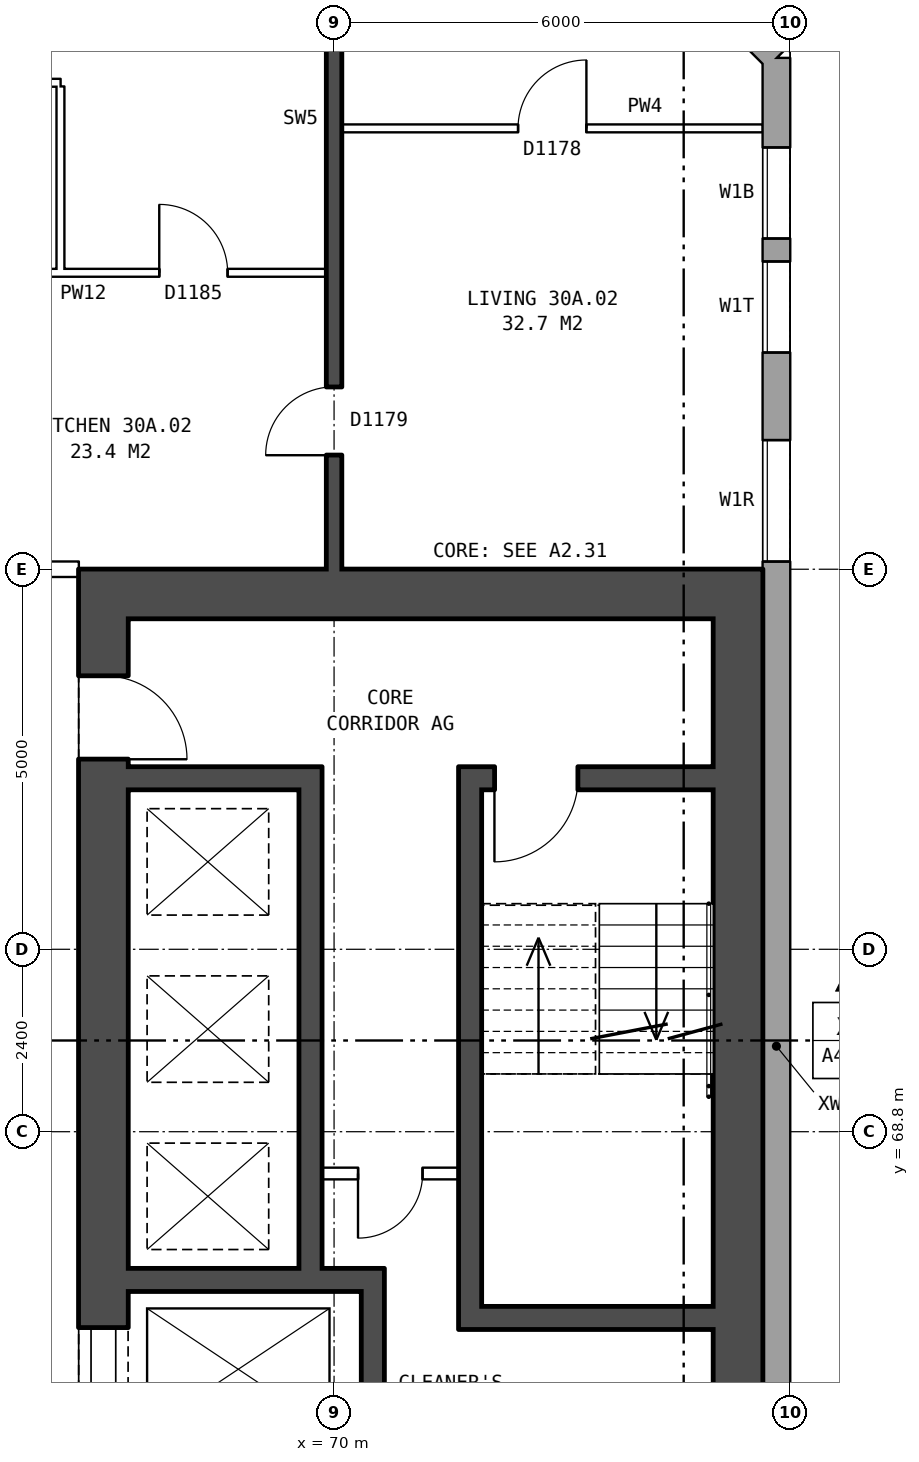
"""IFC4 building model, lengths in metres.
Left out: names, types, materials, properties, quantities, classifications, styles, units other than length and angle.
Written with IfcOpenShell. Run it as: python <this file> out.ifc"""

import sys

from ifc_helpers import new_model, si_unit, direction, frame, frame_2d, origin, place, context, subcontext, project, spatial, rectangle, extrude, element, fill, save


model = new_model("IFC4")
c1 = context("Model", 3, precision=1e-05, world=origin(), true_north=direction((0.0, 1.0)))
c2 = subcontext(c1, "Body", "Model", "MODEL_VIEW")
j1 = project(units=[si_unit("LENGTHUNIT", "METRE"), si_unit("PLANEANGLEUNIT", "RADIAN")], contexts=[c1])
p1 = place(None, origin())
s1 = spatial("IfcSite", under=j1, at=p1, CompositionType="ELEMENT")
p2 = place(p1, origin())
s2 = spatial("IfcBuilding", under=s1, at=p2, CompositionType="ELEMENT")
p3 = place(p2, frame((0.0, 0.0, 108.8)))
s3 = spatial("IfcBuildingStorey", under=s2, at=p3, CompositionType="ELEMENT", Elevation=108.8)
p4 = place(p3, frame((75.82, 57.075, 0.0), z_axis=(0.0, 0.0, 1.0), x_axis=(0.0, 1.0, 0.0)))
e1 = element("IfcWall", 1, at=p4, inside=s3, PredefinedType="STANDARD", context=c2, shape_type="SweptSolid", body=[
    extrude(rectangle(XDim=25.851, YDim=0.36, at=frame_2d((12.925, 0.0))), origin(), (0.0, 0.0, 1.0), 2.85),
])
p5 = place(p4, frame((0.3, 0.0, 0.8)))
e2 = element("IfcOpeningElement", 2, at=p5, cuts=e1, PredefinedType="OPENING", context=c2, shape_type="SweptSolid", body=[
    extrude(rectangle(XDim=1.4, YDim=1.8, at=frame_2d((0.7, 0.9))), frame((0.0, 0.19, 0.0), z_axis=(0.0, -1.0, 0.0), x_axis=(1.0, 0.0, 0.0)), (0.0, 0.0, 1.0), 0.38),
])
p6 = place(p4, frame((4.075, 0.0, 0.25)))
e3 = element("IfcOpeningElement", 3, at=p6, cuts=e1, PredefinedType="OPENING", context=c2, shape_type="SweptSolid", body=[
    extrude(rectangle(XDim=0.6, YDim=0.9, at=frame_2d((0.3, 0.45))), frame((0.0, 0.19, 0.0), z_axis=(0.0, -1.0, 0.0), x_axis=(1.0, 0.0, 0.0)), (0.0, 0.0, 1.0), 0.38),
])
p7 = place(p4, frame((19.225, 0.0, 1.7)))
e4 = element("IfcOpeningElement", 4, at=p7, cuts=e1, PredefinedType="OPENING", context=c2, shape_type="SweptSolid", body=[
    extrude(rectangle(XDim=1.6, YDim=0.9, at=frame_2d((0.8, 0.45))), frame((0.0, 0.19, 0.0), z_axis=(0.0, -1.0, 0.0), x_axis=(1.0, 0.0, 0.0)), (0.0, 0.0, 1.0), 0.38),
])
p8 = place(p4, frame((21.975, 0.0, 0.8)))
e5 = element("IfcOpeningElement", 5, at=p8, cuts=e1, PredefinedType="OPENING", context=c2, shape_type="SweptSolid", body=[
    extrude(rectangle(XDim=1.2, YDim=0.9, at=frame_2d((0.6, 0.45))), frame((0.0, 0.19, 0.0), z_axis=(0.0, -1.0, 0.0), x_axis=(1.0, 0.0, 0.0)), (0.0, 0.0, 1.0), 0.38),
])
p9 = place(p4, frame((2.0, 0.0, 0.8)))
e6 = element("IfcOpeningElement", 6, at=p9, cuts=e1, PredefinedType="OPENING", context=c2, shape_type="SweptSolid", body=[
    extrude(rectangle(XDim=0.8, YDim=1.5, at=frame_2d((0.4, 0.75))), frame((0.0, 0.19, 0.0), z_axis=(0.0, -1.0, 0.0), x_axis=(1.0, 0.0, 0.0)), (0.0, 0.0, 1.0), 0.38),
])
p10 = place(p4, frame((5.075, 0.0, 1.65)))
e7 = element("IfcOpeningElement", 7, at=p10, cuts=e1, PredefinedType="OPENING", context=c2, shape_type="SweptSolid", body=[
    extrude(rectangle(XDim=1.4, YDim=0.9, at=frame_2d((0.7, 0.45))), frame((0.0, 0.19, 0.0), z_axis=(0.0, -1.0, 0.0), x_axis=(1.0, 0.0, 0.0)), (0.0, 0.0, 1.0), 0.38),
])
p11 = place(p4, frame((23.475, 0.0, 0.8)))
e8 = element("IfcOpeningElement", 8, at=p11, cuts=e1, PredefinedType="OPENING", context=c2, shape_type="SweptSolid", body=[
    extrude(rectangle(XDim=1.2, YDim=1.8, at=frame_2d((0.6, 0.9))), frame((0.0, 0.19, 0.0), z_axis=(0.0, -1.0, 0.0), x_axis=(1.0, 0.0, 0.0)), (0.0, 0.0, 1.0), 0.38),
])
p12 = place(p3, frame((75.82, 82.925, 0.0), z_axis=(0.0, 0.0, 1.0), x_axis=(-0.707106781187, 0.707106781187, 0.0)))
e9 = element("IfcWall", 9, at=p12, inside=s3, PredefinedType="STANDARD", context=c2, shape_type="SweptSolid", body=[
    extrude(rectangle(XDim=4.094, YDim=0.36, at=frame_2d((2.047, 0.0))), origin(), (0.0, 0.0, 1.0), 2.85),
])
p13 = place(p12, frame((1.247, 0.0, 0.8)))
e10 = element("IfcOpeningElement", 10, at=p13, cuts=e9, PredefinedType="OPENING", context=c2, shape_type="SweptSolid", body=[
    extrude(rectangle(XDim=1.6, YDim=1.8, at=frame_2d((0.8, 0.9))), frame((0.0, 0.19, 0.0), z_axis=(0.0, -1.0, 0.0), x_axis=(1.0, 0.0, 0.0)), (0.0, 0.0, 1.0), 0.38),
])
p14 = place(p3, frame((66.965, 64.45, 0.0), z_axis=(0.0, 0.0, 1.0), x_axis=(0.0, 1.0, 0.0)))
e11 = element("IfcWall", 11, at=p14, inside=s3, PredefinedType="SHEAR", context=c2, shape_type="SweptSolid", body=[
    extrude(rectangle(XDim=11.1, YDim=0.65, at=frame_2d((5.55, 0.0))), origin(), (0.0, 0.0, 1.0), 2.85),
])
p15 = place(p14, frame((0.675, 0.0, 0.0)))
e12 = element("IfcOpeningElement", 12, at=p15, cuts=e11, PredefinedType="OPENING", context=c2, shape_type="SweptSolid", body=[
    extrude(rectangle(XDim=1.1, YDim=2.1, at=frame_2d((0.55, 1.05))), frame((0.0, 0.335, 0.0), z_axis=(0.0, -1.0, 0.0), x_axis=(1.0, 0.0, 0.0)), (0.0, 0.0, 1.0), 0.67),
])
p16 = place(p14, frame((9.25, 0.0, 0.0)))
e13 = element("IfcOpeningElement", 13, at=p16, cuts=e11, PredefinedType="OPENING", context=c2, shape_type="SweptSolid", body=[
    extrude(rectangle(XDim=1.1, YDim=2.1, at=frame_2d((0.55, 1.05))), frame((0.0, 0.335, 0.0), z_axis=(0.0, -1.0, 0.0), x_axis=(1.0, 0.0, 0.0)), (0.0, 0.0, 1.0), 0.67),
])
p17 = place(p3, frame((75.315, 64.45, 0.0), z_axis=(0.0, 0.0, 1.0), x_axis=(0.0, 1.0, 0.0)))
e14 = element("IfcWall", 14, at=p17, inside=s3, PredefinedType="SHEAR", context=c2, shape_type="SweptSolid", body=[
    extrude(rectangle(XDim=11.1, YDim=0.65, at=frame_2d((5.55, 0.0))), origin(), (0.0, 0.0, 1.0), 2.85),
])
p18 = place(p3, frame((66.64, 75.875, 0.0), z_axis=(0.0, 0.0, 1.0), x_axis=(1.0, 0.0, 0.0)))
e15 = element("IfcWall", 15, at=p18, inside=s3, PredefinedType="SHEAR", context=c2, shape_type="SweptSolid", body=[
    extrude(rectangle(XDim=9.0, YDim=0.65, at=frame_2d((4.5, 0.0))), origin(), (0.0, 0.0, 1.0), 2.85),
])
p19 = place(p3, frame((71.94, 66.35, 0.0), z_axis=(0.0, 0.0, 1.0), x_axis=(1.0, 0.0, 0.0)))
e16 = element("IfcWall", 16, at=p19, inside=s3, PredefinedType="SHEAR", context=c2, shape_type="SweptSolid", body=[
    extrude(rectangle(XDim=3.05, YDim=0.3, at=frame_2d((1.525, 0.0))), origin(), (0.0, 0.0, 1.0), 2.85),
])
p20 = place(p3, frame((67.29, 66.85, 0.0), z_axis=(0.0, 0.0, 1.0), x_axis=(1.0, 0.0, 0.0)))
e17 = element("IfcWall", 17, at=p20, inside=s3, PredefinedType="SHEAR", context=c2, shape_type="SweptSolid", body=[
    extrude(rectangle(XDim=3.37, YDim=0.3, at=frame_2d((1.685, 0.0))), origin(), (0.0, 0.0, 1.0), 2.85),
])
p21 = place(p3, frame((69.84, 68.25, 0.0), z_axis=(0.0, 0.0, 1.0), x_axis=(1.0, 0.0, 0.0)))
e18 = element("IfcWall", 18, at=p21, inside=s3, PredefinedType="PARTITIONING", context=c2, shape_type="SweptSolid", body=[
    extrude(rectangle(XDim=1.8, YDim=0.15, at=frame_2d((0.9, 0.0))), origin(), (0.0, 0.0, 1.0), 2.85),
])
p22 = place(p21, frame((0.475, 0.0, 0.0)))
e19 = element("IfcOpeningElement", 19, at=p22, cuts=e18, PredefinedType="OPENING", context=c2, shape_type="SweptSolid", body=[
    extrude(rectangle(XDim=0.85, YDim=2.1, at=frame_2d((0.425, 1.05))), frame((0.0, 0.085, 0.0), z_axis=(0.0, -1.0, 0.0), x_axis=(1.0, 0.0, 0.0)), (0.0, 0.0, 1.0), 0.17),
])
p23 = place(p3, frame((67.29, 73.45, 0.0), z_axis=(0.0, 0.0, 1.0), x_axis=(1.0, 0.0, 0.0)))
e20 = element("IfcWall", 20, at=p23, inside=s3, PredefinedType="SHEAR", context=c2, shape_type="SweptSolid", body=[
    extrude(rectangle(XDim=2.25, YDim=0.3, at=frame_2d((1.125, 0.0))), origin(), (0.0, 0.0, 1.0), 2.85),
])
p24 = place(p3, frame((71.94, 73.45, 0.0), z_axis=(0.0, 0.0, 1.0), x_axis=(1.0, 0.0, 0.0)))
e21 = element("IfcWall", 21, at=p24, inside=s3, PredefinedType="SHEAR", context=c2, shape_type="SweptSolid", body=[
    extrude(rectangle(XDim=3.05, YDim=0.3, at=frame_2d((1.525, 0.0))), origin(), (0.0, 0.0, 1.0), 2.85),
])
p25 = place(p24, frame((0.17, 0.0, 0.0)))
e22 = element("IfcOpeningElement", 22, at=p25, cuts=e21, PredefinedType="OPENING", context=c2, shape_type="SweptSolid", body=[
    extrude(rectangle(XDim=1.1, YDim=2.1, at=frame_2d((0.55, 1.05))), frame((0.0, 0.16, 0.0), z_axis=(0.0, -1.0, 0.0), x_axis=(1.0, 0.0, 0.0)), (0.0, 0.0, 1.0), 0.32),
])
p26 = place(p3, frame((69.69, 67.0, 0.0), z_axis=(0.0, 0.0, 1.0), x_axis=(0.0, 1.0, 0.0)))
e23 = element("IfcWall", 23, at=p26, inside=s3, PredefinedType="SHEAR", context=c2, shape_type="SweptSolid", body=[
    extrude(rectangle(XDim=6.6, YDim=0.3, at=frame_2d((3.3, 0.0))), origin(), (0.0, 0.0, 1.0), 2.85),
])
p27 = place(p3, frame((70.51, 64.45, 0.0), z_axis=(0.0, 0.0, 1.0), x_axis=(0.0, 1.0, 0.0)))
e24 = element("IfcWall", 24, at=p27, inside=s3, PredefinedType="SHEAR", context=c2, shape_type="SweptSolid", body=[
    extrude(rectangle(XDim=2.25, YDim=0.3, at=frame_2d((1.125, 0.0))), origin(), (0.0, 0.0, 1.0), 2.85),
])
p28 = place(p3, frame((71.79, 66.2, 0.0), z_axis=(0.0, 0.0, 1.0), x_axis=(0.0, 1.0, 0.0)))
e25 = element("IfcWall", 25, at=p28, inside=s3, PredefinedType="SHEAR", context=c2, shape_type="SweptSolid", body=[
    extrude(rectangle(XDim=7.4, YDim=0.3, at=frame_2d((3.7, 0.0))), origin(), (0.0, 0.0, 1.0), 2.85),
])
p29 = place(p3, frame((63.64, 76.2, 0.0), z_axis=(0.0, 0.0, 1.0), x_axis=(1.0, 0.0, 0.0)))
e26 = element("IfcWall", 26, at=p29, inside=s3, PredefinedType="PARTITIONING", context=c2, shape_type="SweptSolid", body=[
    extrude(rectangle(XDim=3.0, YDim=0.2, at=frame_2d((1.5, 0.0))), origin(), (0.0, 0.0, 1.0), 2.85),
])
p30 = place(p29, frame((1.18, 0.0, 0.0)))
e27 = element("IfcOpeningElement", 27, at=p30, cuts=e26, PredefinedType="OPENING", context=c2, shape_type="SweptSolid", body=[
    extrude(rectangle(XDim=1.0, YDim=2.1, at=frame_2d((0.5, 1.05))), frame((0.0, 0.11, 0.0), z_axis=(0.0, -1.0, 0.0), x_axis=(1.0, 0.0, 0.0)), (0.0, 0.0, 1.0), 0.22),
])
p31 = place(p3, frame((64.1, 80.1, 0.0), z_axis=(0.0, 0.0, 1.0), x_axis=(1.0, 0.0, 0.0)))
e28 = element("IfcWall", 28, at=p31, inside=s3, PredefinedType="PARTITIONING", context=c2, shape_type="SweptSolid", body=[
    extrude(rectangle(XDim=5.8, YDim=0.1, at=frame_2d((2.9, 0.0))), origin(), (0.0, 0.0, 1.0), 2.85),
])
p32 = place(p31, frame((3.6, 0.0, 0.0)))
e29 = element("IfcOpeningElement", 29, at=p32, cuts=e28, PredefinedType="OPENING", context=c2, shape_type="SweptSolid", body=[
    extrude(rectangle(XDim=0.9, YDim=2.1, at=frame_2d((0.45, 1.05))), frame((0.0, 0.06, 0.0), z_axis=(0.0, -1.0, 0.0), x_axis=(1.0, 0.0, 0.0)), (0.0, 0.0, 1.0), 0.12),
])
p33 = place(p31, frame((0.7, 0.0, 0.0)))
e30 = element("IfcOpeningElement", 30, at=p33, cuts=e28, PredefinedType="OPENING", context=c2, shape_type="SweptSolid", body=[
    extrude(rectangle(XDim=0.9, YDim=2.1, at=frame_2d((0.45, 1.05))), frame((0.0, 0.06, 0.0), z_axis=(0.0, -1.0, 0.0), x_axis=(1.0, 0.0, 0.0)), (0.0, 0.0, 1.0), 0.12),
])
p34 = place(p3, frame((70.1, 82.0, 0.0), z_axis=(0.0, 0.0, 1.0), x_axis=(1.0, 0.0, 0.0)))
e31 = element("IfcWall", 31, at=p34, inside=s3, PredefinedType="PARTITIONING", context=c2, shape_type="SweptSolid", body=[
    extrude(rectangle(XDim=5.54, YDim=0.1, at=frame_2d((2.77, 0.0))), origin(), (0.0, 0.0, 1.0), 2.85),
])
p35 = place(p34, frame((2.32, 0.0, 0.0)))
e32 = element("IfcOpeningElement", 32, at=p35, cuts=e31, PredefinedType="OPENING", context=c2, shape_type="SweptSolid", body=[
    extrude(rectangle(XDim=0.9, YDim=2.1, at=frame_2d((0.45, 1.05))), frame((0.0, 0.06, 0.0), z_axis=(0.0, -1.0, 0.0), x_axis=(1.0, 0.0, 0.0)), (0.0, 0.0, 1.0), 0.12),
])
p36 = place(p3, frame((64.1, 82.6, 0.0), z_axis=(0.0, 0.0, 1.0), x_axis=(1.0, 0.0, 0.0)))
e33 = element("IfcWall", 33, at=p36, inside=s3, PredefinedType="PARTITIONING", context=c2, shape_type="SweptSolid", body=[
    extrude(rectangle(XDim=2.3, YDim=0.1, at=frame_2d((1.15, 0.0))), origin(), (0.0, 0.0, 1.0), 2.85),
])
p37 = place(p3, frame((66.4, 80.15, 0.0), z_axis=(0.0, 0.0, 1.0), x_axis=(0.0, 1.0, 0.0)))
e34 = element("IfcWall", 34, at=p37, inside=s3, PredefinedType="PARTITIONING", context=c2, shape_type="SweptSolid", body=[
    extrude(rectangle(XDim=2.4, YDim=0.1, at=frame_2d((1.2, 0.0))), origin(), (0.0, 0.0, 1.0), 2.85),
])
p38 = place(p3, frame((70.0, 76.2, 0.0), z_axis=(0.0, 0.0, 1.0), x_axis=(0.0, 1.0, 0.0)))
e35 = element("IfcWall", 35, at=p38, inside=s3, PredefinedType="SOLIDWALL", context=c2, shape_type="SweptSolid", body=[
    extrude(rectangle(XDim=9.44, YDim=0.2, at=frame_2d((4.72, 0.0))), origin(), (0.0, 0.0, 1.0), 2.85),
])
p39 = place(p38, frame((1.5, 0.0, 0.0)))
e36 = element("IfcOpeningElement", 36, at=p39, cuts=e35, PredefinedType="OPENING", context=c2, shape_type="SweptSolid", body=[
    extrude(rectangle(XDim=0.9, YDim=2.1, at=frame_2d((0.45, 1.05))), frame((0.0, 0.11, 0.0), z_axis=(0.0, -1.0, 0.0), x_axis=(1.0, 0.0, 0.0)), (0.0, 0.0, 1.0), 0.22),
])
p40 = place(p7, origin())
e37 = element("IfcWindow", 37, at=p40, inside=s3, PartitioningType="SINGLE_PANEL", PredefinedType="WINDOW", context=c2, shape_type="SweptSolid", body=[
    extrude(rectangle(XDim=1.6, YDim=0.9, at=frame_2d((0.8, 0.45))), frame((0.0, 0.15, 0.0), z_axis=(0.0, -1.0, 0.0), x_axis=(1.0, 0.0, 0.0)), (0.0, 0.0, 1.0), 0.06),
])
fill(e4, e37)
p41 = place(p8, origin())
e38 = element("IfcWindow", 38, at=p41, inside=s3, PartitioningType="SINGLE_PANEL", PredefinedType="WINDOW", context=c2, shape_type="SweptSolid", body=[
    extrude(rectangle(XDim=1.2, YDim=0.9, at=frame_2d((0.6, 0.45))), frame((0.0, 0.15, 0.0), z_axis=(0.0, -1.0, 0.0), x_axis=(1.0, 0.0, 0.0)), (0.0, 0.0, 1.0), 0.06),
])
fill(e5, e38)
p42 = place(p15, origin())
e39 = element("IfcDoor", 39, at=p42, inside=s3, OperationType="DOUBLE_DOOR_SLIDING", PredefinedType="DOOR", context=c2, shape_type="SweptSolid", body=[
    extrude(rectangle(XDim=1.1, YDim=2.1, at=frame_2d((0.55, 1.05))), frame((0.0, -0.26, 0.0), z_axis=(0.0, -1.0, 0.0), x_axis=(1.0, 0.0, 0.0)), (0.0, 0.0, 1.0), 0.05),
])
fill(e12, e39)
p43 = place(p16, frame((1.1, 0.0, 0.0), z_axis=(0.0, 0.0, 1.0), x_axis=(-1.0, 0.0, 0.0)))
e40 = element("IfcDoor", 40, at=p43, inside=s3, OperationType="SINGLE_SWING_RIGHT", PredefinedType="DOOR", context=c2, shape_type="SweptSolid", body=[
    extrude(rectangle(XDim=1.1, YDim=2.1, at=frame_2d((0.55, 1.05))), frame((0.0, 0.31, 0.0), z_axis=(0.0, -1.0, 0.0), x_axis=(1.0, 0.0, 0.0)), (0.0, 0.0, 1.0), 0.05),
])
fill(e13, e40)
p44 = place(p25, frame((1.1, 0.0, 0.0), z_axis=(0.0, 0.0, 1.0), x_axis=(-1.0, 0.0, 0.0)))
e41 = element("IfcDoor", 41, at=p44, inside=s3, OperationType="SINGLE_SWING_RIGHT", PredefinedType="DOOR", context=c2, shape_type="SweptSolid", body=[
    extrude(rectangle(XDim=1.1, YDim=2.1, at=frame_2d((0.55, 1.05))), frame((0.0, 0.025, 0.0), z_axis=(0.0, -1.0, 0.0), x_axis=(1.0, 0.0, 0.0)), (0.0, 0.0, 1.0), 0.05),
])
fill(e22, e41)
p45 = place(p22, frame((0.85, 0.0, 0.0), z_axis=(0.0, 0.0, 1.0), x_axis=(-1.0, 0.0, 0.0)))
e42 = element("IfcDoor", 42, at=p45, inside=s3, OperationType="SINGLE_SWING_RIGHT", PredefinedType="DOOR", context=c2, shape_type="SweptSolid", body=[
    extrude(rectangle(XDim=0.85, YDim=2.1, at=frame_2d((0.425, 1.05))), frame((0.0, 0.025, 0.0), z_axis=(0.0, -1.0, 0.0), x_axis=(1.0, 0.0, 0.0)), (0.0, 0.0, 1.0), 0.05),
])
fill(e19, e42)
p46 = place(p32, origin())
e43 = element("IfcDoor", 43, at=p46, inside=s3, OperationType="SINGLE_SWING_LEFT", PredefinedType="DOOR", context=c2, shape_type="SweptSolid", body=[
    extrude(rectangle(XDim=0.9, YDim=2.1, at=frame_2d((0.45, 1.05))), frame((0.0, 0.025, 0.0), z_axis=(0.0, -1.0, 0.0), x_axis=(1.0, 0.0, 0.0)), (0.0, 0.0, 1.0), 0.05),
])
fill(e29, e43)
p47 = place(p35, origin())
e44 = element("IfcDoor", 44, at=p47, inside=s3, OperationType="SINGLE_SWING_RIGHT", PredefinedType="DOOR", context=c2, shape_type="SweptSolid", body=[
    extrude(rectangle(XDim=0.9, YDim=2.1, at=frame_2d((0.45, 1.05))), frame((0.0, 0.025, 0.0), z_axis=(0.0, -1.0, 0.0), x_axis=(1.0, 0.0, 0.0)), (0.0, 0.0, 1.0), 0.05),
])
fill(e32, e44)
p48 = place(p39, origin())
e45 = element("IfcDoor", 45, at=p48, inside=s3, OperationType="SINGLE_SWING_LEFT", PredefinedType="DOOR", context=c2, shape_type="SweptSolid", body=[
    extrude(rectangle(XDim=0.9, YDim=2.1, at=frame_2d((0.45, 1.05))), frame((0.0, 0.025, 0.0), z_axis=(0.0, -1.0, 0.0), x_axis=(1.0, 0.0, 0.0)), (0.0, 0.0, 1.0), 0.05),
])
fill(e36, e45)
p49 = place(p11, origin())
e46 = element("IfcWindow", 46, at=p49, inside=s3, PartitioningType="SINGLE_PANEL", PredefinedType="WINDOW", context=c2, shape_type="SweptSolid", body=[
    extrude(rectangle(XDim=1.2, YDim=1.8, at=frame_2d((0.6, 0.9))), frame((0.0, 0.15, 0.0), z_axis=(0.0, -1.0, 0.0), x_axis=(1.0, 0.0, 0.0)), (0.0, 0.0, 1.0), 0.06),
])
fill(e8, e46)
save(model, sys.argv[1])
